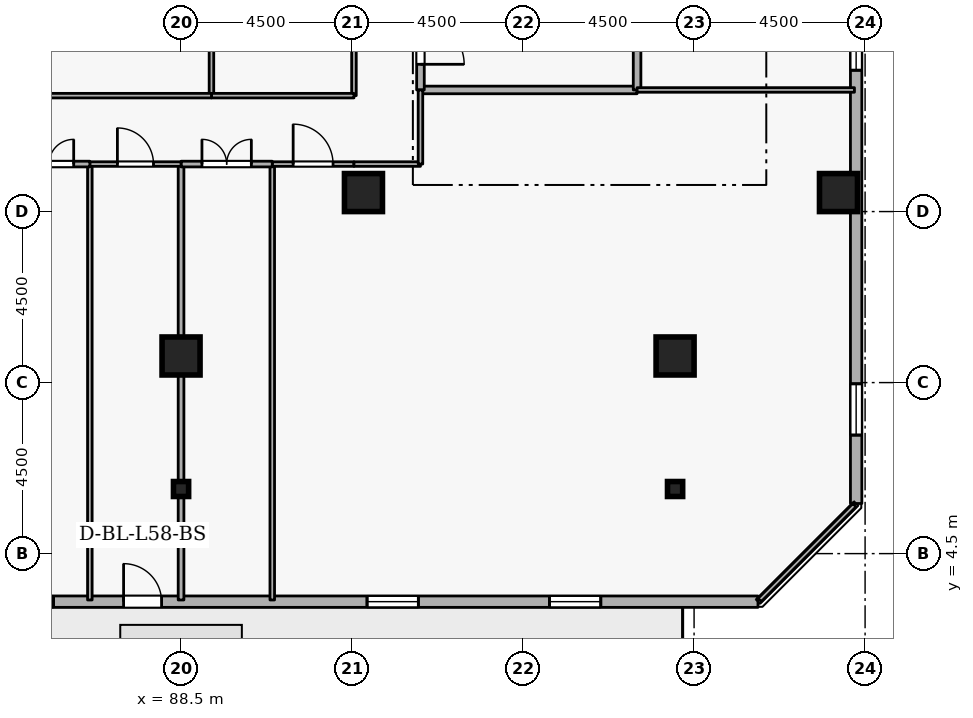
"""IFC4 building model, lengths in metres.
Left out: names, types, materials, properties, quantities, classifications, styles, units other than length and angle.
Written with IfcOpenShell. Run it as: python <this file> out.ifc"""

import sys

from ifc_helpers import new_model, si_unit, direction, frame, frame_2d, origin, origin_2d, place, context, subcontext, project, spatial, rectangle, i_section, extrude, element, fill, save


model = new_model("IFC4")
c1 = context("Model", 3, precision=1e-05, world=origin(), true_north=direction((0.0, 1.0)))
c2 = subcontext(c1, "Body", "Model", "MODEL_VIEW")
j1 = project(units=[si_unit("LENGTHUNIT", "METRE"), si_unit("PLANEANGLEUNIT", "RADIAN")], contexts=[c1])
p1 = place(None, origin())
s1 = spatial("IfcSite", under=j1, at=p1, CompositionType="ELEMENT")
p2 = place(p1, origin())
s2 = spatial("IfcBuilding", under=s1, at=p2, CompositionType="ELEMENT")
p3 = place(p2, frame((0.0, 0.0, 218.1)))
s3 = spatial("IfcBuildingStorey", under=s2, at=p3, CompositionType="ELEMENT", Elevation=218.1)
for number, where, z_axis, x_axis in (
    (1, (105.8, 14.0, 0.0), (0.0, 0.0, 1.0), (1.0, 0.0, 0.0)),
    (2, (101.5, 9.7, 0.0), (0.0, 0.0, 1.0), (1.0, 0.0, 0.0)),
    (3, (88.5, 9.7, 0.0), (0.0, 0.0, 1.0), (1.0, 0.0, 0.0)),
    (4, (93.3, 14.0, 0.0), (0.0, 0.0, 1.0), (1.0, 0.0, 0.0)),
):
    element("IfcColumn", number, at=place(p3, frame(where, z_axis=z_axis, x_axis=x_axis)), inside=s3, PredefinedType="COLUMN", context=c2, shape_type="SweptSolid", body=[
        extrude(rectangle(XDim=1.0, YDim=1.0, at=origin_2d()), origin(), (0.0, 0.0, 1.0), 3.6),
    ])
for number, where, z_axis, x_axis in (
    (5, (101.5, 6.2, 0.0), (0.0, 0.0, 1.0), (1.0, 0.0, 0.0)),
    (6, (88.5, 6.2, 0.0), (0.0, 0.0, 1.0), (1.0, 0.0, 0.0)),
):
    element("IfcColumn", number, at=place(p3, frame(where, z_axis=z_axis, x_axis=x_axis)), inside=s3, PredefinedType="COLUMN", context=c2, shape_type="SweptSolid", body=[
        extrude(i_section(OverallWidth=0.399, OverallDepth=0.394, WebThickness=0.023, FlangeThickness=0.037, FilletRadius=0.015, at=origin_2d()), origin(), (0.0, 0.0, 1.0), 3.6),
    ])
p4 = place(p3, frame((67.594, 3.236, 0.0), z_axis=(0.0, 0.0, 1.0), x_axis=(0.999999999634, -2.7061402e-05, 0.0)))
e7 = element("IfcWall", 7, at=p4, inside=s3, PredefinedType="STANDARD", context=c2, shape_type="SweptSolid", body=[
    extrude(rectangle(XDim=36.087, YDim=0.3, at=frame_2d((18.043, 0.0))), origin(), (0.0, 0.0, 1.0), 2.66),
])
p5 = place(p4, frame((19.393, 0.0, 0.0)))
e8 = element("IfcOpeningElement", 8, at=p5, cuts=e7, PredefinedType="OPENING", context=c2, shape_type="SweptSolid", body=[
    extrude(rectangle(XDim=1.0, YDim=2.08, at=frame_2d((0.5, 1.04))), frame((0.0, 0.16, 0.0), z_axis=(0.0, -1.0, 0.0), x_axis=(1.0, 0.0, 0.0)), (0.0, 0.0, 1.0), 0.32),
])
p6 = place(p4, frame((1.8, 0.0, 0.72)))
e9 = element("IfcOpeningElement", 9, at=p6, cuts=e7, PredefinedType="OPENING", context=c2, shape_type="SweptSolid", body=[
    extrude(rectangle(XDim=1.35, YDim=1.05, at=frame_2d((0.675, 0.525))), frame((0.0, 0.16, 0.0), z_axis=(0.0, -1.0, 0.0), x_axis=(1.0, 0.0, 0.0)), (0.0, 0.0, 1.0), 0.32),
])
p7 = place(p4, frame((6.6, 0.0, 0.72)))
e10 = element("IfcOpeningElement", 10, at=p7, cuts=e7, PredefinedType="OPENING", context=c2, shape_type="SweptSolid", body=[
    extrude(rectangle(XDim=1.35, YDim=1.05, at=frame_2d((0.675, 0.525))), frame((0.0, 0.16, 0.0), z_axis=(0.0, -1.0, 0.0), x_axis=(1.0, 0.0, 0.0)), (0.0, 0.0, 1.0), 0.32),
])
p8 = place(p4, frame((11.4, 0.0, 0.72)))
e11 = element("IfcOpeningElement", 11, at=p8, cuts=e7, PredefinedType="OPENING", context=c2, shape_type="SweptSolid", body=[
    extrude(rectangle(XDim=1.35, YDim=1.05, at=frame_2d((0.675, 0.525))), frame((0.0, 0.16, 0.0), z_axis=(0.0, -1.0, 0.0), x_axis=(1.0, 0.0, 0.0)), (0.0, 0.0, 1.0), 0.32),
])
p9 = place(p4, frame((16.2, 0.0, 0.72)))
e12 = element("IfcOpeningElement", 12, at=p9, cuts=e7, PredefinedType="OPENING", context=c2, shape_type="SweptSolid", body=[
    extrude(rectangle(XDim=1.35, YDim=1.05, at=frame_2d((0.675, 0.525))), frame((0.0, 0.16, 0.0), z_axis=(0.0, -1.0, 0.0), x_axis=(1.0, 0.0, 0.0)), (0.0, 0.0, 1.0), 0.32),
])
p10 = place(p4, frame((25.8, 0.0, 0.72)))
e13 = element("IfcOpeningElement", 13, at=p10, cuts=e7, PredefinedType="OPENING", context=c2, shape_type="SweptSolid", body=[
    extrude(rectangle(XDim=1.35, YDim=1.05, at=frame_2d((0.675, 0.525))), frame((0.0, 0.16, 0.0), z_axis=(0.0, -1.0, 0.0), x_axis=(1.0, 0.0, 0.0)), (0.0, 0.0, 1.0), 0.32),
])
p11 = place(p4, frame((30.6, 0.0, 0.72)))
e14 = element("IfcOpeningElement", 14, at=p11, cuts=e7, PredefinedType="OPENING", context=c2, shape_type="SweptSolid", body=[
    extrude(rectangle(XDim=1.35, YDim=1.05, at=frame_2d((0.675, 0.525))), frame((0.0, 0.16, 0.0), z_axis=(0.0, -1.0, 0.0), x_axis=(1.0, 0.0, 0.0)), (0.0, 0.0, 1.0), 0.32),
])
p12 = place(p3, frame((106.265, 5.819, 0.0), z_axis=(0.0, 0.0, 1.0), x_axis=(-2.7061402e-05, 0.999999999634, 0.0)))
e15 = element("IfcWall", 15, at=p12, inside=s3, PredefinedType="STANDARD", context=c2, shape_type="SweptSolid", body=[
    extrude(rectangle(XDim=36.087, YDim=0.3, at=frame_2d((18.043, 0.0))), origin(), (0.0, 0.0, 1.0), 2.66),
])
p13 = place(p12, frame((1.8, 0.0, 0.72)))
e16 = element("IfcOpeningElement", 16, at=p13, cuts=e15, PredefinedType="OPENING", context=c2, shape_type="SweptSolid", body=[
    extrude(rectangle(XDim=1.35, YDim=1.05, at=frame_2d((0.675, 0.525))), frame((0.0, 0.16, 0.0), z_axis=(0.0, -1.0, 0.0), x_axis=(1.0, 0.0, 0.0)), (0.0, 0.0, 1.0), 0.32),
])
p14 = place(p12, frame((11.4, 0.0, 0.72)))
e17 = element("IfcOpeningElement", 17, at=p14, cuts=e15, PredefinedType="OPENING", context=c2, shape_type="SweptSolid", body=[
    extrude(rectangle(XDim=1.35, YDim=1.05, at=frame_2d((0.675, 0.525))), frame((0.0, 0.16, 0.0), z_axis=(0.0, -1.0, 0.0), x_axis=(1.0, 0.0, 0.0)), (0.0, 0.0, 1.0), 0.32),
])
p15 = place(p12, frame((16.2, 0.0, 0.72)))
e18 = element("IfcOpeningElement", 18, at=p15, cuts=e15, PredefinedType="OPENING", context=c2, shape_type="SweptSolid", body=[
    extrude(rectangle(XDim=1.35, YDim=1.05, at=frame_2d((0.675, 0.525))), frame((0.0, 0.16, 0.0), z_axis=(0.0, -1.0, 0.0), x_axis=(1.0, 0.0, 0.0)), (0.0, 0.0, 1.0), 0.32),
])
p16 = place(p12, frame((25.8, 0.0, 0.72)))
e19 = element("IfcOpeningElement", 19, at=p16, cuts=e15, PredefinedType="OPENING", context=c2, shape_type="SweptSolid", body=[
    extrude(rectangle(XDim=1.35, YDim=1.05, at=frame_2d((0.675, 0.525))), frame((0.0, 0.16, 0.0), z_axis=(0.0, -1.0, 0.0), x_axis=(1.0, 0.0, 0.0)), (0.0, 0.0, 1.0), 0.32),
])
p17 = place(p3, frame((94.8, 16.7, 0.0), z_axis=(0.0, 0.0, 1.0), x_axis=(1.0, 0.0, 0.0)))
e20 = element("IfcWall", 20, at=p17, inside=s3, PredefinedType="STANDARD", context=c2, shape_type="SweptSolid", body=[
    extrude(rectangle(XDim=5.7, YDim=0.2, at=frame_2d((2.85, 0.0))), origin(), (0.0, 0.0, 1.0), 3.26),
])
p18 = place(p3, frame((100.5, 16.7, 0.0), z_axis=(0.0, 0.0, 1.0), x_axis=(0.0, 1.0, 0.0)))
e21 = element("IfcWall", 21, at=p18, inside=s3, PredefinedType="STANDARD", context=c2, shape_type="SweptSolid", body=[
    extrude(rectangle(XDim=2.5, YDim=0.2, at=frame_2d((1.25, 0.0))), origin(), (0.0, 0.0, 1.0), 3.26),
])
p19 = place(p3, frame((94.8, 19.2, 0.0), z_axis=(0.0, 0.0, 1.0), x_axis=(0.0, -1.0, 0.0)))
e22 = element("IfcWall", 22, at=p19, inside=s3, PredefinedType="STANDARD", context=c2, shape_type="SweptSolid", body=[
    extrude(rectangle(XDim=2.5, YDim=0.2, at=frame_2d((1.25, 0.0))), origin(), (0.0, 0.0, 1.0), 3.26),
])
p20 = place(p19, frame((0.675, 0.0, 0.0)))
e23 = element("IfcOpeningElement", 23, at=p20, cuts=e22, PredefinedType="OPENING", context=c2, shape_type="SweptSolid", body=[
    extrude(rectangle(XDim=1.15, YDim=2.1, at=frame_2d((0.575, 1.05))), frame((0.0, 0.11, 0.0), z_axis=(0.0, -1.0, 0.0), x_axis=(1.0, 0.0, 0.0)), (0.0, 0.0, 1.0), 0.22),
])
p21 = place(p3, frame((90.9, 3.28, 0.0), z_axis=(0.0, 0.0, 1.0), x_axis=(0.0, 1.0, 0.0)))
e24 = element("IfcWall", 24, at=p21, inside=s3, PredefinedType="PARTITIONING", context=c2, shape_type="SweptSolid", body=[
    extrude(rectangle(XDim=11.47, YDim=0.12, at=frame_2d((5.735, 0.0))), origin(), (0.0, 0.0, 1.0), 3.26),
])
p22 = place(p3, frame((90.9, 14.75, 0.0), z_axis=(0.0, 0.0, 1.0), x_axis=(1.0, 0.0, 0.0)))
e25 = element("IfcWall", 25, at=p22, inside=s3, PredefinedType="PARTITIONING", context=c2, shape_type="SweptSolid", body=[
    extrude(rectangle(XDim=2.15, YDim=0.12, at=frame_2d((1.075, 0.0))), origin(), (0.0, 0.0, 1.0), 3.26),
])
p23 = place(p22, frame((0.55, 0.0, 0.0)))
e26 = element("IfcOpeningElement", 26, at=p23, cuts=e25, PredefinedType="OPENING", context=c2, shape_type="SweptSolid", body=[
    extrude(rectangle(XDim=1.05, YDim=2.1, at=frame_2d((0.525, 1.05))), frame((0.0, 0.07, 0.0), z_axis=(0.0, -1.0, 0.0), x_axis=(1.0, 0.0, 0.0)), (0.0, 0.0, 1.0), 0.14),
])
p24 = place(p3, frame((93.05, 14.75, 0.0), z_axis=(0.0, 0.0, 1.0), x_axis=(1.0, 0.0, 0.0)))
e27 = element("IfcWall", 27, at=p24, inside=s3, PredefinedType="PARTITIONING", context=c2, shape_type="SweptSolid", body=[
    extrude(rectangle(XDim=1.75, YDim=0.12, at=frame_2d((0.875, 0.0))), origin(), (0.0, 0.0, 1.0), 3.26),
])
p25 = place(p3, frame((94.8, 14.75, 0.0), z_axis=(0.0, 0.0, 1.0), x_axis=(0.0, 1.0, 0.0)))
e28 = element("IfcWall", 28, at=p25, inside=s3, PredefinedType="PARTITIONING", context=c2, shape_type="SweptSolid", body=[
    extrude(rectangle(XDim=1.95, YDim=0.12, at=frame_2d((0.975, 0.0))), origin(), (0.0, 0.0, 1.0), 3.26),
])
p26 = place(p3, frame((100.5, 16.7, 0.0), z_axis=(0.0, 0.0, 1.0), x_axis=(1.0, 0.0, 0.0)))
e29 = element("IfcWall", 29, at=p26, inside=s3, PredefinedType="PARTITIONING", context=c2, shape_type="SweptSolid", body=[
    extrude(rectangle(XDim=5.72, YDim=0.12, at=frame_2d((2.86, 0.0))), origin(), (0.0, 0.0, 1.0), 3.26),
])
p27 = place(p3, frame((106.22, 5.775, 0.0), z_axis=(0.0, 0.0, 1.0), x_axis=(-0.707106781187, -0.707106781187, 0.0)))
e30 = element("IfcWall", 30, at=p27, inside=s3, PredefinedType="PARTITIONING", context=c2, shape_type="SweptSolid", body=[
    extrude(rectangle(XDim=3.528, YDim=0.12, at=frame_2d((1.764, 0.0))), origin(), (0.0, 0.0, 1.0), 3.26),
])
p28 = place(p3, frame((88.5, 3.28, 0.0), z_axis=(0.0, 0.0, 1.0), x_axis=(0.0, 1.0, 0.0)))
e31 = element("IfcWall", 31, at=p28, inside=s3, PredefinedType="PARTITIONING", context=c2, shape_type="SweptSolid", body=[
    extrude(rectangle(XDim=11.47, YDim=0.15, at=frame_2d((5.735, 0.0))), origin(), (0.0, 0.0, 1.0), 2.802),
])
p29 = place(p3, frame((88.5, 14.75, 0.0), z_axis=(0.0, 0.0, 1.0), x_axis=(1.0, 0.0, 0.0)))
e32 = element("IfcWall", 32, at=p29, inside=s3, PredefinedType="PARTITIONING", context=c2, shape_type="SweptSolid", body=[
    extrude(rectangle(XDim=2.4, YDim=0.15, at=frame_2d((1.2, 0.0))), origin(), (0.0, 0.0, 1.0), 3.26),
])
p30 = place(p29, frame((0.55, 0.0, 0.0)))
e33 = element("IfcOpeningElement", 33, at=p30, cuts=e32, PredefinedType="OPENING", context=c2, shape_type="SweptSolid", body=[
    extrude(rectangle(XDim=1.3, YDim=2.12, at=frame_2d((0.65, 1.06))), frame((0.0, 0.085, 0.0), z_axis=(0.0, -1.0, 0.0), x_axis=(1.0, 0.0, 0.0)), (0.0, 0.0, 1.0), 0.17),
])
p31 = place(p3, frame((86.1, 3.28, 0.0), z_axis=(0.0, 0.0, 1.0), x_axis=(0.0, 1.0, 0.0)))
e34 = element("IfcWall", 34, at=p31, inside=s3, PredefinedType="PARTITIONING", context=c2, shape_type="SweptSolid", body=[
    extrude(rectangle(XDim=11.47, YDim=0.12, at=frame_2d((5.735, 0.0))), origin(), (0.0, 0.0, 1.0), 3.26),
])
p32 = place(p3, frame((86.1, 14.75, 0.0), z_axis=(0.0, 0.0, 1.0), x_axis=(1.0, 0.0, 0.0)))
e35 = element("IfcWall", 35, at=p32, inside=s3, PredefinedType="PARTITIONING", context=c2, shape_type="SweptSolid", body=[
    extrude(rectangle(XDim=2.4, YDim=0.12, at=frame_2d((1.2, 0.0))), origin(), (0.0, 0.0, 1.0), 3.26),
])
p33 = place(p32, frame((0.725, 0.0, 0.0)))
e36 = element("IfcOpeningElement", 36, at=p33, cuts=e35, PredefinedType="OPENING", context=c2, shape_type="SweptSolid", body=[
    extrude(rectangle(XDim=0.95, YDim=2.1, at=frame_2d((0.475, 1.05))), frame((0.0, 0.07, 0.0), z_axis=(0.0, -1.0, 0.0), x_axis=(1.0, 0.0, 0.0)), (0.0, 0.0, 1.0), 0.14),
])
p34 = place(p3, frame((83.95, 14.75, 0.0), z_axis=(0.0, 0.0, 1.0), x_axis=(1.0, 0.0, 0.0)))
e37 = element("IfcWall", 37, at=p34, inside=s3, PredefinedType="PARTITIONING", context=c2, shape_type="SweptSolid", body=[
    extrude(rectangle(XDim=2.15, YDim=0.15, at=frame_2d((1.075, 0.0))), origin(), (0.0, 0.0, 1.0), 3.26),
])
p35 = place(p34, frame((0.425, 0.0, 0.0)))
e38 = element("IfcOpeningElement", 38, at=p35, cuts=e37, PredefinedType="OPENING", context=c2, shape_type="SweptSolid", body=[
    extrude(rectangle(XDim=1.3, YDim=2.12, at=frame_2d((0.65, 1.06))), frame((0.0, 0.085, 0.0), z_axis=(0.0, -1.0, 0.0), x_axis=(1.0, 0.0, 0.0)), (0.0, 0.0, 1.0), 0.17),
])
p36 = place(p3, frame((89.3, 16.55, 0.0), z_axis=(0.0, 0.0, 1.0), x_axis=(0.0, 1.0, 0.0)))
e39 = element("IfcWall", 39, at=p36, inside=s3, PredefinedType="PARTITIONING", context=c2, shape_type="SweptSolid", body=[
    extrude(rectangle(XDim=5.85, YDim=0.12, at=frame_2d((2.925, 0.0))), origin(), (0.0, 0.0, 1.0), 3.26),
])
p37 = place(p3, frame((93.05, 22.4, 0.0), z_axis=(0.0, 0.0, 1.0), x_axis=(0.0, -1.0, 0.0)))
e40 = element("IfcWall", 40, at=p37, inside=s3, PredefinedType="PARTITIONING", context=c2, shape_type="SweptSolid", body=[
    extrude(rectangle(XDim=5.85, YDim=0.12, at=frame_2d((2.925, 0.0))), origin(), (0.0, 0.0, 1.0), 3.26),
])
p38 = place(p37, frame((2.45, 0.0, 0.0)))
e41 = element("IfcOpeningElement", 41, at=p38, cuts=e40, PredefinedType="OPENING", context=c2, shape_type="SweptSolid", body=[
    extrude(rectangle(XDim=0.95, YDim=2.1, at=frame_2d((0.475, 1.05))), frame((0.0, 0.07, 0.0), z_axis=(0.0, -1.0, 0.0), x_axis=(1.0, 0.0, 0.0)), (0.0, 0.0, 1.0), 0.14),
])
p39 = place(p3, frame((93.05, 16.55, 0.0), z_axis=(0.0, 0.0, 1.0), x_axis=(-1.0, 0.0, 0.0)))
e42 = element("IfcWall", 42, at=p39, inside=s3, PredefinedType="PARTITIONING", context=c2, shape_type="SweptSolid", body=[
    extrude(rectangle(XDim=3.75, YDim=0.12, at=frame_2d((1.875, 0.0))), origin(), (0.0, 0.0, 1.0), 3.26),
])
p40 = place(p3, frame((89.3, 16.55, 0.0), z_axis=(0.0, 0.0, 1.0), x_axis=(-1.0, 0.0, 0.0)))
e43 = element("IfcWall", 43, at=p40, inside=s3, PredefinedType="PARTITIONING", context=c2, shape_type="SweptSolid", body=[
    extrude(rectangle(XDim=5.35, YDim=0.12, at=frame_2d((2.675, 0.0))), origin(), (0.0, 0.0, 1.0), 3.26),
])
p41 = place(p5, origin())
e44 = element("IfcDoor", 44, at=p41, inside=s3, OperationType="SINGLE_SWING_LEFT", PredefinedType="DOOR", context=c2, shape_type="SweptSolid", body=[
    extrude(rectangle(XDim=1.0, YDim=2.08, at=frame_2d((0.5, 1.04))), frame((0.0, 0.025, 0.0), z_axis=(0.0, -1.0, 0.0), x_axis=(1.0, 0.0, 0.0)), (0.0, 0.0, 1.0), 0.05),
])
fill(e8, e44)
p42 = place(p9, origin())
e45 = element("IfcWindow", 45, at=p42, inside=s3, PartitioningType="SINGLE_PANEL", PredefinedType="WINDOW", context=c2, shape_type="SweptSolid", body=[
    extrude(rectangle(XDim=1.35, YDim=1.05, at=frame_2d((0.675, 0.525))), frame((0.0, 0.03, 0.0), z_axis=(0.0, -1.0, 0.0), x_axis=(1.0, 0.0, 0.0)), (0.0, 0.0, 1.0), 0.06),
])
fill(e12, e45)
p43 = place(p10, origin())
e46 = element("IfcWindow", 46, at=p43, inside=s3, PartitioningType="SINGLE_PANEL", PredefinedType="WINDOW", context=c2, shape_type="SweptSolid", body=[
    extrude(rectangle(XDim=1.35, YDim=1.05, at=frame_2d((0.675, 0.525))), frame((0.0, 0.03, 0.0), z_axis=(0.0, -1.0, 0.0), x_axis=(1.0, 0.0, 0.0)), (0.0, 0.0, 1.0), 0.06),
])
fill(e13, e46)
p44 = place(p11, origin())
e47 = element("IfcWindow", 47, at=p44, inside=s3, PartitioningType="SINGLE_PANEL", PredefinedType="WINDOW", context=c2, shape_type="SweptSolid", body=[
    extrude(rectangle(XDim=1.35, YDim=1.05, at=frame_2d((0.675, 0.525))), frame((0.0, 0.03, 0.0), z_axis=(0.0, -1.0, 0.0), x_axis=(1.0, 0.0, 0.0)), (0.0, 0.0, 1.0), 0.06),
])
fill(e14, e47)
p45 = place(p13, origin())
e48 = element("IfcWindow", 48, at=p45, inside=s3, PartitioningType="SINGLE_PANEL", PredefinedType="WINDOW", context=c2, shape_type="SweptSolid", body=[
    extrude(rectangle(XDim=1.35, YDim=1.05, at=frame_2d((0.675, 0.525))), frame((0.0, 0.03, 0.0), z_axis=(0.0, -1.0, 0.0), x_axis=(1.0, 0.0, 0.0)), (0.0, 0.0, 1.0), 0.06),
])
fill(e16, e48)
p46 = place(p14, origin())
e49 = element("IfcWindow", 49, at=p46, inside=s3, PartitioningType="SINGLE_PANEL", PredefinedType="WINDOW", context=c2, shape_type="SweptSolid", body=[
    extrude(rectangle(XDim=1.35, YDim=1.05, at=frame_2d((0.675, 0.525))), frame((0.0, 0.03, 0.0), z_axis=(0.0, -1.0, 0.0), x_axis=(1.0, 0.0, 0.0)), (0.0, 0.0, 1.0), 0.06),
])
fill(e17, e49)
p47 = place(p20, origin())
e50 = element("IfcDoor", 50, at=p47, inside=s3, OperationType="SINGLE_SWING_RIGHT", PredefinedType="DOOR", context=c2, shape_type="SweptSolid", body=[
    extrude(rectangle(XDim=1.15, YDim=2.1, at=frame_2d((0.575, 1.05))), frame((0.0, 0.025, 0.0), z_axis=(0.0, -1.0, 0.0), x_axis=(1.0, 0.0, 0.0)), (0.0, 0.0, 1.0), 0.05),
])
fill(e23, e50)
p48 = place(p23, origin())
e51 = element("IfcDoor", 51, at=p48, inside=s3, OperationType="SINGLE_SWING_LEFT", PredefinedType="DOOR", context=c2, shape_type="SweptSolid", body=[
    extrude(rectangle(XDim=1.05, YDim=2.1, at=frame_2d((0.525, 1.05))), frame((0.0, 0.025, 0.0), z_axis=(0.0, -1.0, 0.0), x_axis=(1.0, 0.0, 0.0)), (0.0, 0.0, 1.0), 0.05),
])
fill(e26, e51)
p49 = place(p30, origin())
e52 = element("IfcDoor", 52, at=p49, inside=s3, OperationType="DOUBLE_DOOR_SINGLE_SWING", PredefinedType="DOOR", context=c2, shape_type="SweptSolid", body=[
    extrude(rectangle(XDim=1.3, YDim=2.12, at=frame_2d((0.65, 1.06))), frame((0.0, 0.025, 0.0), z_axis=(0.0, -1.0, 0.0), x_axis=(1.0, 0.0, 0.0)), (0.0, 0.0, 1.0), 0.05),
])
fill(e33, e52)
p50 = place(p33, origin())
e53 = element("IfcDoor", 53, at=p50, inside=s3, OperationType="SINGLE_SWING_LEFT", PredefinedType="DOOR", context=c2, shape_type="SweptSolid", body=[
    extrude(rectangle(XDim=0.95, YDim=2.1, at=frame_2d((0.475, 1.05))), frame((0.0, 0.025, 0.0), z_axis=(0.0, -1.0, 0.0), x_axis=(1.0, 0.0, 0.0)), (0.0, 0.0, 1.0), 0.05),
])
fill(e36, e53)
p51 = place(p35, origin())
e54 = element("IfcDoor", 54, at=p51, inside=s3, OperationType="DOUBLE_DOOR_SINGLE_SWING", PredefinedType="DOOR", context=c2, shape_type="SweptSolid", body=[
    extrude(rectangle(XDim=1.3, YDim=2.12, at=frame_2d((0.65, 1.06))), frame((0.0, 0.025, 0.0), z_axis=(0.0, -1.0, 0.0), x_axis=(1.0, 0.0, 0.0)), (0.0, 0.0, 1.0), 0.05),
])
fill(e38, e54)
save(model, sys.argv[1])
